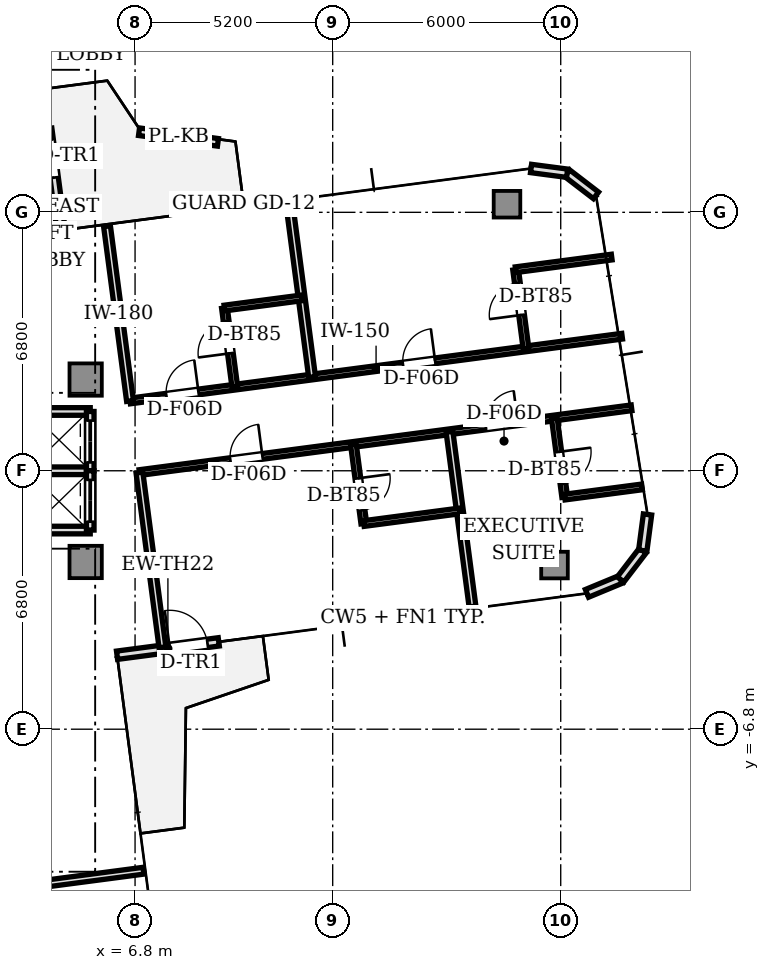
"""IFC4 building model, lengths in metres.
Left out: names, types, materials, properties, quantities, classifications, styles, units other than length and angle.
Written with IfcOpenShell. Run it as: python <this file> out.ifc"""

import sys

from ifc_helpers import new_model, si_unit, direction, frame, frame_2d, origin, origin_2d, place, context, subcontext, project, spatial, rectangle, extrude, source, transform, mapped, element, fill, save


model = new_model("IFC4")
c1 = context("Model", 3, precision=1e-05, world=origin(), true_north=direction((0.0, 1.0)))
c2 = subcontext(c1, "Body", "Model", "MODEL_VIEW")
j1 = project(units=[si_unit("LENGTHUNIT", "METRE"), si_unit("PLANEANGLEUNIT", "RADIAN")], contexts=[c1])
p1 = place(None, origin())
s1 = spatial("IfcSite", under=j1, at=p1, CompositionType="ELEMENT")
p2 = place(p1, origin())
s2 = spatial("IfcBuilding", under=s1, at=p2, CompositionType="ELEMENT")
p3 = place(p2, frame((0.0, 0.0, 226.6)))
s3 = spatial("IfcBuildingStorey", under=s2, at=p3, CompositionType="ELEMENT", Elevation=226.6)
m1 = source(origin(), c2, "Body", "SweptSolid", [
    extrude(rectangle(XDim=0.85, YDim=0.85, at=origin_2d()), origin(), (0.0, 0.0, 1.0), 3.05),
])
for number, where, z_axis, x_axis in (
    (1, (5.5, 2.4, 0.0), (0.0, 0.0, 1.0), (1.0, 0.0, 0.0)),
    (2, (5.5, -2.4, 0.0), (0.0, 0.0, 1.0), (1.0, 0.0, 0.0)),
):
    element("IfcColumn", number, at=place(p3, frame(where, z_axis=z_axis, x_axis=x_axis)), inside=s3, PredefinedType="COLUMN", context=c2, shape_type="MappedRepresentation", body=[
        mapped(m1, transform((0.0, 0.0, 0.0), scale=1.0)),
    ])
m2 = source(origin(), c2, "Body", "SweptSolid", [
    extrude(rectangle(XDim=0.7, YDim=0.7, at=origin_2d()), origin(), (0.0, 0.0, 1.0), 3.05),
])
for number, where, z_axis, x_axis in (
    (3, (17.836, -2.481, 0.0), (0.0, 0.0, 1.0), (1.0, 0.0, 0.0)),
    (4, (16.586, 7.013, 0.0), (0.0, 0.0, 1.0), (1.0, 0.0, 0.0)),
):
    element("IfcColumn", number, at=place(p3, frame(where, z_axis=z_axis, x_axis=x_axis)), inside=s3, PredefinedType="COLUMN", context=c2, shape_type="MappedRepresentation", body=[
        mapped(m2, transform((0.0, 0.0, 0.0), scale=1.0)),
    ])
p4 = place(p3, frame((6.326, -4.854, 0.0), z_axis=(0.0, 0.0, 1.0), x_axis=(0.991439824936, 0.130564442062, 0.0)))
e5 = element("IfcWall", 5, at=p4, inside=s3, PredefinedType="STANDARD", context=c2, shape_type="SweptSolid", body=[
    extrude(rectangle(XDim=2.7, YDim=0.22, at=frame_2d((1.35, 0.0))), origin(), (0.0, 0.0, 1.0), 3.05),
])
p5 = place(p4, frame((1.4, 0.0, 0.0)))
e6 = element("IfcOpeningElement", 6, at=p5, cuts=e5, PredefinedType="OPENING", context=c2, shape_type="SweptSolid", body=[
    extrude(rectangle(XDim=1.0, YDim=2.2, at=frame_2d((0.5, 1.1))), frame((0.0, 0.12, 0.0), z_axis=(0.0, -1.0, 0.0), x_axis=(1.0, 0.0, 0.0)), (0.0, 0.0, 1.0), 0.24),
])
p6 = place(p3, frame((18.691, -3.226, 0.0), z_axis=(0.0, 0.0, 1.0), x_axis=(0.923979554509, 0.382441868588, 0.0)))
e7 = element("IfcWall", 7, at=p6, inside=s3, PredefinedType="STANDARD", context=c2, shape_type="SweptSolid", body=[
    extrude(rectangle(XDim=0.958, YDim=0.22, at=frame_2d((0.479, 0.0))), origin(), (0.0, 0.0, 1.0), 3.05),
])
p7 = place(p3, frame((19.576, -2.86, 0.0), z_axis=(0.0, 0.0, 1.0), x_axis=(0.60865090536, 0.79343813584, 0.0)))
e8 = element("IfcWall", 8, at=p7, inside=s3, PredefinedType="STANDARD", context=c2, shape_type="SweptSolid", body=[
    extrude(rectangle(XDim=0.958, YDim=0.22, at=frame_2d((0.479, 0.0))), origin(), (0.0, 0.0, 1.0), 3.05),
])
for number, where, z_axis, x_axis in (
    (9, (20.159, -2.1, 0.0), (0.0, 0.0, 1.0), (0.131, 0.991, 0.0)),
    (10, (18.928, 7.246, 0.0), (0.0, 0.0, 1.0), (-0.793, 0.609, 0.0)),
):
    element("IfcWall", number, at=place(p3, frame(where, z_axis=z_axis, x_axis=x_axis)), inside=s3, PredefinedType="STANDARD", context=c2, shape_type="SweptSolid", body=[
        extrude(rectangle(XDim=0.958, YDim=0.22, at=frame_2d((0.479, 0.0))), origin(), (0.0, 0.0, 1.0), 3.05),
    ])
p8 = place(p3, frame((18.169, 7.829, 0.0), z_axis=(0.0, 0.0, 1.0), x_axis=(-0.991444747987, 0.130527053476, 0.0)))
e11 = element("IfcWall", 11, at=p8, inside=s3, PredefinedType="STANDARD", context=c2, shape_type="SweptSolid", body=[
    extrude(rectangle(XDim=0.958, YDim=0.22, at=frame_2d((0.479, 0.0))), origin(), (0.0, 0.0, 1.0), 3.05),
])
p9 = place(p3, frame((4.854, 6.326, 0.0), z_axis=(0.0, 0.0, 1.0), x_axis=(-0.130564442062, 0.991439824936, 0.0)))
e12 = element("IfcWall", 12, at=p9, inside=s3, PredefinedType="STANDARD", context=c2, shape_type="SweptSolid", body=[
    extrude(rectangle(XDim=2.7, YDim=0.22, at=frame_2d((1.35, 0.0))), origin(), (0.0, 0.0, 1.0), 3.05),
])
p10 = place(p9, frame((1.4, 0.0, 0.0)))
e13 = element("IfcOpeningElement", 13, at=p10, cuts=e12, PredefinedType="OPENING", context=c2, shape_type="SweptSolid", body=[
    extrude(rectangle(XDim=1.0, YDim=2.2, at=frame_2d((0.5, 1.1))), frame((0.0, 0.12, 0.0), z_axis=(0.0, -1.0, 0.0), x_axis=(1.0, 0.0, 0.0)), (0.0, 0.0, 1.0), 0.24),
])
p11 = place(p3, frame((8.981, 8.642, 0.0), z_axis=(0.0, 0.0, 1.0), x_axis=(-0.991074582074, 0.133308562245, 0.0)))
e14 = element("IfcWall", 14, at=p11, inside=s3, PredefinedType="PARAPET", context=c2, shape_type="SweptSolid", body=[
    extrude(rectangle(XDim=2.095, YDim=0.2, at=frame_2d((1.048, 0.0))), origin(), (0.0, 0.0, 1.0), 0.65),
])
for number, where, z_axis, x_axis in (
    (15, (3.98, 1.56, 0.0), (0.0, 0.0, 1.0), (1.0, 0.0, 0.0)),
    (16, (3.98, -1.56, 0.0), (0.0, 0.0, 1.0), (1.0, 0.0, 0.0)),
    (17, (3.98, 0.0, 0.0), (0.0, 0.0, 1.0), (1.0, 0.0, 0.0)),
):
    element("IfcWall", number, at=place(p3, frame(where, z_axis=z_axis, x_axis=x_axis)), inside=s3, PredefinedType="SOLIDWALL", context=c2, shape_type="SweptSolid", body=[
        extrude(rectangle(XDim=1.64, YDim=0.2, at=frame_2d((0.82, 0.0))), origin(), (0.0, 0.0, 1.0), 2.6),
    ])
p12 = place(p3, frame((5.62, 0.0, 0.0), z_axis=(0.0, 0.0, 1.0), x_axis=(0.0, 1.0, 0.0)))
e18 = element("IfcWall", 18, at=p12, inside=s3, PredefinedType="SOLIDWALL", context=c2, shape_type="SweptSolid", body=[
    extrude(rectangle(XDim=1.56, YDim=0.2, at=frame_2d((0.78, 0.0))), origin(), (0.0, 0.0, 1.0), 2.6),
])
p13 = place(p12, frame((0.22, 0.0, 0.0)))
e19 = element("IfcOpeningElement", 19, at=p13, cuts=e18, PredefinedType="OPENING", context=c2, shape_type="SweptSolid", body=[
    extrude(rectangle(XDim=1.1, YDim=2.2, at=frame_2d((0.55, 1.1))), frame((0.0, 0.11, 0.0), z_axis=(0.0, -1.0, 0.0), x_axis=(1.0, 0.0, 0.0)), (0.0, 0.0, 1.0), 0.22),
])
p14 = place(p3, frame((5.62, -1.56, 0.0), z_axis=(0.0, 0.0, 1.0), x_axis=(0.0, 1.0, 0.0)))
e20 = element("IfcWall", 20, at=p14, inside=s3, PredefinedType="SOLIDWALL", context=c2, shape_type="SweptSolid", body=[
    extrude(rectangle(XDim=1.56, YDim=0.2, at=frame_2d((0.78, 0.0))), origin(), (0.0, 0.0, 1.0), 2.6),
])
p15 = place(p14, frame((0.22, 0.0, 0.0)))
e21 = element("IfcOpeningElement", 21, at=p15, cuts=e20, PredefinedType="OPENING", context=c2, shape_type="SweptSolid", body=[
    extrude(rectangle(XDim=1.1, YDim=2.2, at=frame_2d((0.55, 1.1))), frame((0.0, 0.11, 0.0), z_axis=(0.0, -1.0, 0.0), x_axis=(1.0, 0.0, 0.0)), (0.0, 0.0, 1.0), 0.22),
])
p16 = place(p3, frame((6.667, 1.836, 0.0), z_axis=(0.0, 0.0, 1.0), x_axis=(0.991445639992, 0.130520277895, 0.0)))
e22 = element("IfcWall", 22, at=p16, inside=s3, PredefinedType="PARTITIONING", context=c2, shape_type="SweptSolid", body=[
    extrude(rectangle(XDim=13.06, YDim=0.15, at=frame_2d((6.53, 0.0))), origin(), (0.0, 0.0, 1.0), 2.6),
])
p17 = place(p16, frame((0.966, 0.0, 0.0)))
e23 = element("IfcOpeningElement", 23, at=p17, cuts=e22, PredefinedType="OPENING", context=c2, shape_type="SweptSolid", body=[
    extrude(rectangle(XDim=0.85, YDim=2.1, at=frame_2d((0.425, 1.05))), frame((0.0, 0.085, 0.0), z_axis=(0.0, -1.0, 0.0), x_axis=(1.0, 0.0, 0.0)), (0.0, 0.0, 1.0), 0.17),
])
p18 = place(p16, frame((7.246, 0.0, 0.0)))
e24 = element("IfcOpeningElement", 24, at=p18, cuts=e22, PredefinedType="OPENING", context=c2, shape_type="SweptSolid", body=[
    extrude(rectangle(XDim=0.85, YDim=2.1, at=frame_2d((0.425, 1.05))), frame((0.0, 0.085, 0.0), z_axis=(0.0, -1.0, 0.0), x_axis=(1.0, 0.0, 0.0)), (0.0, 0.0, 1.0), 0.17),
])
p19 = place(p3, frame((6.915, -0.048, 0.0), z_axis=(0.0, 0.0, 1.0), x_axis=(0.991443539316, 0.130536233856, 0.0)))
e25 = element("IfcWall", 25, at=p19, inside=s3, PredefinedType="PARTITIONING", context=c2, shape_type="SweptSolid", body=[
    extrude(rectangle(XDim=13.06, YDim=0.15, at=frame_2d((6.53, 0.0))), origin(), (0.0, 0.0, 1.0), 2.6),
])
p20 = place(p19, frame((2.414, 0.0, 0.0)))
e26 = element("IfcOpeningElement", 26, at=p20, cuts=e25, PredefinedType="OPENING", context=c2, shape_type="SweptSolid", body=[
    extrude(rectangle(XDim=0.85, YDim=2.1, at=frame_2d((0.425, 1.05))), frame((0.0, 0.085, 0.0), z_axis=(0.0, -1.0, 0.0), x_axis=(1.0, 0.0, 0.0)), (0.0, 0.0, 1.0), 0.17),
])
p21 = place(p19, frame((9.194, 0.0, 0.0)))
e27 = element("IfcOpeningElement", 27, at=p21, cuts=e25, PredefinedType="OPENING", context=c2, shape_type="SweptSolid", body=[
    extrude(rectangle(XDim=0.85, YDim=2.1, at=frame_2d((0.425, 1.05))), frame((0.0, 0.085, 0.0), z_axis=(0.0, -1.0, 0.0), x_axis=(1.0, 0.0, 0.0)), (0.0, 0.0, 1.0), 0.17),
])
p22 = place(p3, frame((6.667, 1.836, 0.0), z_axis=(0.0, 0.0, 1.0), x_axis=(-0.130543018951, 0.991442645947, 0.0)))
e28 = element("IfcWall", 28, at=p22, inside=s3, PredefinedType="PARTITIONING", context=c2, shape_type="SweptSolid", body=[
    extrude(rectangle(XDim=4.638, YDim=0.18, at=frame_2d((2.319, 0.0))), origin(), (0.0, 0.0, 1.0), 2.6),
])
p23 = place(p3, frame((7.521, -4.646, 0.0), z_axis=(0.0, 0.0, 1.0), x_axis=(-0.130549832066, 0.991441748842, 0.0)))
e29 = element("IfcWall", 29, at=p23, inside=s3, PredefinedType="PARTITIONING", context=c2, shape_type="SweptSolid", body=[
    extrude(rectangle(XDim=4.638, YDim=0.18, at=frame_2d((2.319, 0.0))), origin(), (0.0, 0.0, 1.0), 2.6),
])
p24 = place(p3, frame((11.458, 2.467, 0.0), z_axis=(0.0, 0.0, 1.0), x_axis=(-0.130498087646, 0.991448561006, 0.0)))
e30 = element("IfcWall", 30, at=p24, inside=s3, PredefinedType="PARTITIONING", context=c2, shape_type="SweptSolid", body=[
    extrude(rectangle(XDim=4.638, YDim=0.18, at=frame_2d((2.319, 0.0))), origin(), (0.0, 0.0, 1.0), 2.6),
])
p25 = place(p3, frame((9.426, 2.199, 0.0), z_axis=(0.0, 0.0, 1.0), x_axis=(-0.130457520295, 0.991453899785, 0.0)))
e31 = element("IfcWall", 31, at=p25, inside=s3, PredefinedType="PARTITIONING", context=c2, shape_type="SweptSolid", body=[
    extrude(rectangle(XDim=2.1, YDim=0.15, at=frame_2d((1.05, 0.0))), origin(), (0.0, 0.0, 1.0), 2.6),
])
p26 = place(p25, frame((0.9, 0.0, 0.0)))
e32 = element("IfcOpeningElement", 32, at=p26, cuts=e31, PredefinedType="OPENING", context=c2, shape_type="SweptSolid", body=[
    extrude(rectangle(XDim=0.85, YDim=2.1, at=frame_2d((0.425, 1.05))), frame((0.0, 0.085, 0.0), z_axis=(0.0, -1.0, 0.0), x_axis=(1.0, 0.0, 0.0)), (0.0, 0.0, 1.0), 0.17),
])
p27 = place(p3, frame((9.152, 4.281, 0.0), z_axis=(0.0, 0.0, 1.0), x_axis=(0.991444969909, 0.13052536781, 0.0)))
e33 = element("IfcWall", 33, at=p27, inside=s3, PredefinedType="PARTITIONING", context=c2, shape_type="SweptSolid", body=[
    extrude(rectangle(XDim=2.05, YDim=0.15, at=frame_2d((1.025, 0.0))), origin(), (0.0, 0.0, 1.0), 2.6),
])
p28 = place(p3, frame((17.087, 3.208, 0.0), z_axis=(0.0, 0.0, 1.0), x_axis=(-0.13044248305, 0.9914558783, 0.0)))
e34 = element("IfcWall", 34, at=p28, inside=s3, PredefinedType="PARTITIONING", context=c2, shape_type="SweptSolid", body=[
    extrude(rectangle(XDim=2.1, YDim=0.15, at=frame_2d((1.05, 0.0))), origin(), (0.0, 0.0, 1.0), 2.57),
])
p29 = place(p28, frame((0.9, 0.0, 0.0)))
e35 = element("IfcOpeningElement", 35, at=p29, cuts=e34, PredefinedType="OPENING", context=c2, shape_type="SweptSolid", body=[
    extrude(rectangle(XDim=0.85, YDim=2.1, at=frame_2d((0.425, 1.05))), frame((0.0, 0.085, 0.0), z_axis=(0.0, -1.0, 0.0), x_axis=(1.0, 0.0, 0.0)), (0.0, 0.0, 1.0), 0.17),
])
p30 = place(p3, frame((16.813, 5.29, 0.0), z_axis=(0.0, 0.0, 1.0), x_axis=(0.99143571012, 0.130595684076, 0.0)))
e36 = element("IfcWall", 36, at=p30, inside=s3, PredefinedType="PARTITIONING", context=c2, shape_type="SweptSolid", body=[
    extrude(rectangle(XDim=2.55, YDim=0.15, at=frame_2d((1.275, 0.0))), origin(), (0.0, 0.0, 1.0), 2.6),
])
p31 = place(p3, frame((15.073, 1.026, 0.0), z_axis=(0.0, 0.0, 1.0), x_axis=(0.130549832066, -0.991441748842, 0.0)))
e37 = element("IfcWall", 37, at=p31, inside=s3, PredefinedType="PARTITIONING", context=c2, shape_type="SweptSolid", body=[
    extrude(rectangle(XDim=4.638, YDim=0.18, at=frame_2d((2.319, 0.0))), origin(), (0.0, 0.0, 1.0), 2.6),
])
p32 = place(p3, frame((12.545, 0.693, 0.0), z_axis=(0.0, 0.0, 1.0), x_axis=(0.13044248305, -0.9914558783, 0.0)))
e38 = element("IfcWall", 38, at=p32, inside=s3, PredefinedType="PARTITIONING", context=c2, shape_type="SweptSolid", body=[
    extrude(rectangle(XDim=2.1, YDim=0.15, at=frame_2d((1.05, 0.0))), origin(), (0.0, 0.0, 1.0), 2.6),
])
p33 = place(p32, frame((0.9, 0.0, 0.0)))
e39 = element("IfcOpeningElement", 39, at=p33, cuts=e38, PredefinedType="OPENING", context=c2, shape_type="SweptSolid", body=[
    extrude(rectangle(XDim=0.85, YDim=2.1, at=frame_2d((0.425, 1.05))), frame((0.0, 0.085, 0.0), z_axis=(0.0, -1.0, 0.0), x_axis=(1.0, 0.0, 0.0)), (0.0, 0.0, 1.0), 0.17),
])
p34 = place(p3, frame((12.819, -1.389, 0.0), z_axis=(0.0, 0.0, 1.0), x_axis=(0.99144973294, 0.130489183661, 0.0)))
e40 = element("IfcWall", 40, at=p34, inside=s3, PredefinedType="PARTITIONING", context=c2, shape_type="SweptSolid", body=[
    extrude(rectangle(XDim=2.55, YDim=0.15, at=frame_2d((1.275, 0.0))), origin(), (0.0, 0.0, 1.0), 2.6),
])
p35 = place(p3, frame((17.831, 1.389, 0.0), z_axis=(0.0, 0.0, 1.0), x_axis=(0.13044248305, -0.9914558783, 0.0)))
e41 = element("IfcWall", 41, at=p35, inside=s3, PredefinedType="PARTITIONING", context=c2, shape_type="SweptSolid", body=[
    extrude(rectangle(XDim=2.1, YDim=0.15, at=frame_2d((1.05, 0.0))), origin(), (0.0, 0.0, 1.0), 2.6),
])
p36 = place(p35, frame((0.9, 0.0, 0.0)))
e42 = element("IfcOpeningElement", 42, at=p36, cuts=e41, PredefinedType="OPENING", context=c2, shape_type="SweptSolid", body=[
    extrude(rectangle(XDim=0.85, YDim=2.1, at=frame_2d((0.425, 1.05))), frame((0.0, 0.085, 0.0), z_axis=(0.0, -1.0, 0.0), x_axis=(1.0, 0.0, 0.0)), (0.0, 0.0, 1.0), 0.17),
])
p37 = place(p3, frame((18.105, -0.693, 0.0), z_axis=(0.0, 0.0, 1.0), x_axis=(0.991444969909, 0.13052536781, 0.0)))
e43 = element("IfcWall", 43, at=p37, inside=s3, PredefinedType="PARTITIONING", context=c2, shape_type="SweptSolid", body=[
    extrude(rectangle(XDim=2.05, YDim=0.15, at=frame_2d((1.025, 0.0))), origin(), (0.0, 0.0, 1.0), 2.6),
])
p38 = place(p3, frame((-1.877, -11.695, 0.0), z_axis=(0.0, 0.0, 1.0), x_axis=(0.991444386854, 0.130529796508, 0.0)))
e44 = element("IfcWall", 44, at=p38, inside=s3, PredefinedType="PARTITIONING", context=c2, shape_type="SweptSolid", body=[
    extrude(rectangle(XDim=8.976, YDim=0.18, at=frame_2d((4.488, 0.0))), origin(), (0.0, 0.0, 1.0), 2.6),
])
m3 = source(origin(), c2, "Body", "SweptSolid", [
    extrude(rectangle(XDim=1.0, YDim=0.05, at=origin_2d()), origin(), (0.0, 0.0, 1.0), 2.2),
])
p39 = place(p5, frame((0.5, 0.0, 0.0)))
e45 = element("IfcDoor", 45, at=p39, inside=s3, OperationType="SINGLE_SWING_LEFT", PredefinedType="DOOR", context=c2, shape_type="MappedRepresentation", body=[
    mapped(m3, transform((0.0, 0.0, 0.0), scale=1.0)),
])
fill(e6, e45)
p40 = place(p10, frame((0.5, 0.0, 0.0)))
e46 = element("IfcDoor", 46, at=p40, inside=s3, OperationType="SINGLE_SWING_LEFT", PredefinedType="DOOR", context=c2, shape_type="MappedRepresentation", body=[
    mapped(m3, transform((0.0, 0.0, 0.0), scale=1.0)),
])
fill(e13, e46)
m4 = source(origin(), c2, "Body", "SweptSolid", [
    extrude(rectangle(XDim=1.1, YDim=0.05, at=origin_2d()), origin(), (0.0, 0.0, 1.0), 2.2),
])
p41 = place(p13, frame((0.55, 0.0, 0.0)))
e47 = element("IfcDoor", 47, at=p41, inside=s3, OperationType="DOUBLE_DOOR_SLIDING", PredefinedType="DOOR", context=c2, shape_type="MappedRepresentation", body=[
    mapped(m4, transform((0.0, 0.0, 0.0), scale=1.0)),
])
fill(e19, e47)
p42 = place(p15, frame((0.55, 0.0, 0.0)))
e48 = element("IfcDoor", 48, at=p42, inside=s3, OperationType="DOUBLE_DOOR_SLIDING", PredefinedType="DOOR", context=c2, shape_type="MappedRepresentation", body=[
    mapped(m4, transform((0.0, 0.0, 0.0), scale=1.0)),
])
fill(e21, e48)
m5 = source(origin(), c2, "Body", "SweptSolid", [
    extrude(rectangle(XDim=0.85, YDim=0.05, at=origin_2d()), origin(), (0.0, 0.0, 1.0), 2.1),
])
p43 = place(p26, frame((0.425, 0.0, 0.0)))
e49 = element("IfcDoor", 49, at=p43, inside=s3, OperationType="SINGLE_SWING_LEFT", PredefinedType="DOOR", context=c2, shape_type="MappedRepresentation", body=[
    mapped(m5, transform((0.0, 0.0, 0.0), scale=1.0)),
])
fill(e32, e49)
p44 = place(p17, frame((0.425, 0.0, 0.0)))
e50 = element("IfcDoor", 50, at=p44, inside=s3, OperationType="SINGLE_SWING_RIGHT", PredefinedType="DOOR", context=c2, shape_type="MappedRepresentation", body=[
    mapped(m5, transform((0.0, 0.0, 0.0), scale=1.0)),
])
fill(e23, e50)
p45 = place(p29, frame((0.425, 0.0, 0.0)))
e51 = element("IfcDoor", 51, at=p45, inside=s3, OperationType="SINGLE_SWING_LEFT", PredefinedType="DOOR", context=c2, shape_type="MappedRepresentation", body=[
    mapped(m5, transform((0.0, 0.0, 0.0), scale=1.0)),
])
fill(e35, e51)
p46 = place(p18, frame((0.425, 0.0, 0.0)))
e52 = element("IfcDoor", 52, at=p46, inside=s3, OperationType="SINGLE_SWING_RIGHT", PredefinedType="DOOR", context=c2, shape_type="MappedRepresentation", body=[
    mapped(m5, transform((0.0, 0.0, 0.0), scale=1.0)),
])
fill(e24, e52)
p47 = place(p33, frame((0.425, 0.0, 0.0)))
e53 = element("IfcDoor", 53, at=p47, inside=s3, OperationType="SINGLE_SWING_LEFT", PredefinedType="DOOR", context=c2, shape_type="MappedRepresentation", body=[
    mapped(m5, transform((0.0, 0.0, 0.0), scale=1.0)),
])
fill(e39, e53)
p48 = place(p20, frame((0.425, 0.0, 0.0)))
e54 = element("IfcDoor", 54, at=p48, inside=s3, OperationType="SINGLE_SWING_RIGHT", PredefinedType="DOOR", context=c2, shape_type="MappedRepresentation", body=[
    mapped(m5, transform((0.0, 0.0, 0.0), scale=1.0)),
])
fill(e26, e54)
p49 = place(p36, frame((0.425, 0.0, 0.0)))
e55 = element("IfcDoor", 55, at=p49, inside=s3, OperationType="SINGLE_SWING_LEFT", PredefinedType="DOOR", context=c2, shape_type="MappedRepresentation", body=[
    mapped(m5, transform((0.0, 0.0, 0.0), scale=1.0)),
])
fill(e42, e55)
p50 = place(p21, frame((0.425, 0.0, 0.0)))
e56 = element("IfcDoor", 56, at=p50, inside=s3, OperationType="SINGLE_SWING_RIGHT", PredefinedType="DOOR", context=c2, shape_type="MappedRepresentation", body=[
    mapped(m5, transform((0.0, 0.0, 0.0), scale=1.0)),
])
fill(e27, e56)
save(model, sys.argv[1])
